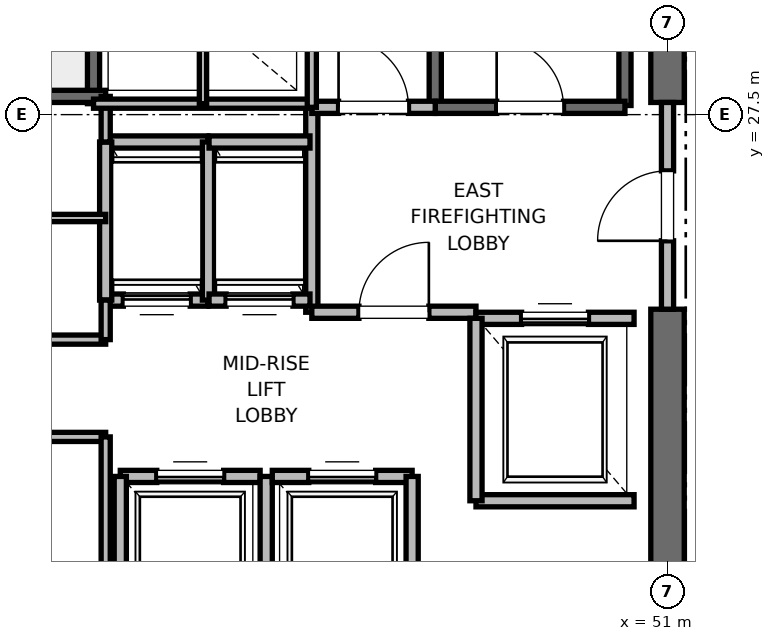
"""IFC4 building model, lengths in metres.
Left out: names, types, materials, properties, quantities, classifications, styles, units other than length and angle.
Written with IfcOpenShell. Run it as: python <this file> out.ifc"""

import sys

from ifc_helpers import new_model, si_unit, direction, frame, frame_2d, origin, place, context, subcontext, project, spatial, rectangle, extrude, element, fill, save


model = new_model("IFC4")
c1 = context("Model", 3, precision=1e-05, world=origin(), true_north=direction((0.0, 1.0)))
c2 = subcontext(c1, "Body", "Model", "MODEL_VIEW")
j1 = project(units=[si_unit("LENGTHUNIT", "METRE"), si_unit("PLANEANGLEUNIT", "RADIAN")], contexts=[c1])
p1 = place(None, origin())
s1 = spatial("IfcSite", under=j1, at=p1, CompositionType="ELEMENT")
p2 = place(p1, origin())
s2 = spatial("IfcBuilding", under=s1, at=p2, CompositionType="ELEMENT")
p3 = place(p2, frame((0.0, 0.0, 217.2)))
s3 = spatial("IfcBuildingStorey", under=s2, at=p3, CompositionType="ELEMENT", Elevation=217.2)
p4 = place(p3, frame((51.0, 18.5, 0.0), z_axis=(0.0, 0.0, 1.0), x_axis=(0.0, 1.0, 0.0)))
e1 = element("IfcWall", 1, at=p4, inside=s3, PredefinedType="SHEAR", context=c2, shape_type="SweptSolid", body=[
    extrude(rectangle(XDim=5.8, YDim=0.55, at=frame_2d((2.9, 0.0))), origin(), (0.0, 0.0, 1.0), 3.775),
])
p5 = place(p3, frame((51.0, 27.7, 0.0), z_axis=(0.0, 0.0, 1.0), x_axis=(0.0, 1.0, 0.0)))
e2 = element("IfcWall", 2, at=p5, inside=s3, PredefinedType="SHEAR", context=c2, shape_type="SweptSolid", body=[
    extrude(rectangle(XDim=8.8, YDim=0.55, at=frame_2d((4.4, 0.0))), origin(), (0.0, 0.0, 1.0), 3.775),
])
p6 = place(p3, frame((50.3, 27.65, 0.0), z_axis=(0.0, 0.0, 1.0), x_axis=(0.0, 1.0, 0.0)))
e3 = element("IfcWall", 3, at=p6, inside=s3, PredefinedType="SOLIDWALL", context=c2, shape_type="SweptSolid", body=[
    extrude(rectangle(XDim=8.15, YDim=0.2, at=frame_2d((4.075, 0.0))), origin(), (0.0, 0.0, 1.0), 3.775),
])
p7 = place(p3, frame((47.18, 27.62, 0.0), z_axis=(0.0, 0.0, 1.0), x_axis=(0.0, 1.0, 0.0)))
e4 = element("IfcWall", 4, at=p7, inside=s3, PredefinedType="SOLIDWALL", context=c2, shape_type="SweptSolid", body=[
    extrude(rectangle(XDim=8.18, YDim=0.2, at=frame_2d((4.09, 0.0))), origin(), (0.0, 0.0, 1.0), 3.775),
])
p8 = place(p3, frame((47.18, 27.62, 0.0), z_axis=(0.0, 0.0, 1.0), x_axis=(1.0, 0.0, 0.0)))
e5 = element("IfcWall", 5, at=p8, inside=s3, PredefinedType="SOLIDWALL", context=c2, shape_type="SweptSolid", body=[
    extrude(rectangle(XDim=3.12, YDim=0.2, at=frame_2d((1.56, 0.0))), origin(), (0.0, 0.0, 1.0), 3.775),
])
p9 = place(p8, frame((1.01, 0.0, 0.0)))
e6 = element("IfcOpeningElement", 6, at=p9, cuts=e5, PredefinedType="OPENING", context=c2, shape_type="SweptSolid", body=[
    extrude(rectangle(XDim=1.1, YDim=2.15, at=frame_2d((0.55, 1.075))), frame((0.0, 0.1, 0.0), z_axis=(0.0, -1.0, 0.0), x_axis=(1.0, 0.0, 0.0)), (0.0, 0.0, 1.0), 0.2),
])
p10 = place(p3, frame((41.56, 27.68, 0.0), z_axis=(0.0, 0.0, 1.0), x_axis=(0.0, 1.0, 0.0)))
e7 = element("IfcWall", 7, at=p10, inside=s3, PredefinedType="SOLIDWALL", context=c2, shape_type="SweptSolid", body=[
    extrude(rectangle(XDim=8.57, YDim=0.2, at=frame_2d((4.285, 0.0))), origin(), (0.0, 0.0, 1.0), 3.775),
])
p11 = place(p3, frame((38.44, 27.8, 0.0), z_axis=(0.0, 0.0, 1.0), x_axis=(1.0, 0.0, 0.0)))
e8 = element("IfcWall", 8, at=p11, inside=s3, PredefinedType="SOLIDWALL", context=c2, shape_type="SweptSolid", body=[
    extrude(rectangle(XDim=3.32, YDim=0.2, at=frame_2d((1.66, 0.0))), origin(), (0.0, 0.0, 1.0), 3.775),
])
p12 = place(p3, frame((45.15, 24.25, 0.0), z_axis=(0.0, 0.0, 1.0), x_axis=(0.0, 1.0, 0.0)))
e9 = element("IfcWall", 9, at=p12, inside=s3, PredefinedType="PARTITIONING", context=c2, shape_type="SweptSolid", body=[
    extrude(rectangle(XDim=3.37, YDim=0.2, at=frame_2d((1.685, 0.0))), origin(), (0.0, 0.0, 1.0), 3.775),
])
p13 = place(p3, frame((45.15, 24.25, 0.0), z_axis=(0.0, 0.0, 1.0), x_axis=(1.0, 0.0, 0.0)))
e10 = element("IfcWall", 10, at=p13, inside=s3, PredefinedType="PARTITIONING", context=c2, shape_type="SweptSolid", body=[
    extrude(rectangle(XDim=2.7, YDim=0.2, at=frame_2d((1.35, 0.0))), origin(), (0.0, 0.0, 1.0), 3.775),
])
p14 = place(p13, frame((0.775, 0.0, 0.0)))
e11 = element("IfcOpeningElement", 11, at=p14, cuts=e10, PredefinedType="OPENING", context=c2, shape_type="SweptSolid", body=[
    extrude(rectangle(XDim=1.15, YDim=2.2, at=frame_2d((0.575, 1.1))), frame((0.0, 0.1, 0.0), z_axis=(0.0, -1.0, 0.0), x_axis=(1.0, 0.0, 0.0)), (0.0, 0.0, 1.0), 0.2),
])
p15 = place(p3, frame((45.15, 27.62, 0.0), z_axis=(0.0, 0.0, 1.0), x_axis=(1.0, 0.0, 0.0)))
e12 = element("IfcWall", 12, at=p15, inside=s3, PredefinedType="PARTITIONING", context=c2, shape_type="SweptSolid", body=[
    extrude(rectangle(XDim=2.03, YDim=0.2, at=frame_2d((1.015, 0.0))), origin(), (0.0, 0.0, 1.0), 3.775),
])
p16 = place(p15, frame((0.44, 0.0, 0.0)))
e13 = element("IfcOpeningElement", 13, at=p16, cuts=e12, PredefinedType="OPENING", context=c2, shape_type="SweptSolid", body=[
    extrude(rectangle(XDim=1.15, YDim=2.2, at=frame_2d((0.575, 1.1))), frame((0.0, 0.1, 0.0), z_axis=(0.0, -1.0, 0.0), x_axis=(1.0, 0.0, 0.0)), (0.0, 0.0, 1.0), 0.2),
])
p17 = place(p3, frame((51.0, 24.3, 0.0), z_axis=(0.0, 0.0, 1.0), x_axis=(0.0, 1.0, 0.0)))
e14 = element("IfcWall", 14, at=p17, inside=s3, PredefinedType="PARTITIONING", context=c2, shape_type="SweptSolid", body=[
    extrude(rectangle(XDim=3.4, YDim=0.2, at=frame_2d((1.7, 0.0))), origin(), (0.0, 0.0, 1.0), 2.755),
])
p18 = place(p17, frame((1.125, 0.0, 0.0)))
e15 = element("IfcOpeningElement", 15, at=p18, cuts=e14, PredefinedType="OPENING", context=c2, shape_type="SweptSolid", body=[
    extrude(rectangle(XDim=1.15, YDim=2.2, at=frame_2d((0.575, 1.1))), frame((0.0, 0.1, 0.0), z_axis=(0.0, -1.0, 0.0), x_axis=(1.0, 0.0, 0.0)), (0.0, 0.0, 1.0), 0.2),
])
p19 = place(p3, frame((47.85, 21.15, 0.0), z_axis=(0.0, 0.0, 1.0), x_axis=(1.0, 0.0, 0.0)))
e16 = element("IfcWall", 16, at=p19, inside=s3, PredefinedType="SOLIDWALL", context=c2, shape_type="SweptSolid", body=[
    extrude(rectangle(XDim=2.6, YDim=0.2, at=frame_2d((1.3, 0.0))), origin(), (0.0, 0.0, 1.0), 3.775),
])
p20 = place(p3, frame((50.45, 24.15, 0.0), z_axis=(0.0, 0.0, 1.0), x_axis=(-1.0, 0.0, 0.0)))
e17 = element("IfcWall", 17, at=p20, inside=s3, PredefinedType="SOLIDWALL", context=c2, shape_type="SweptSolid", body=[
    extrude(rectangle(XDim=2.6, YDim=0.2, at=frame_2d((1.3, 0.0))), origin(), (0.0, 0.0, 1.0), 2.755),
])
p21 = place(p20, frame((0.75, 0.0, 0.0)))
e18 = element("IfcOpeningElement", 18, at=p21, cuts=e17, PredefinedType="OPENING", context=c2, shape_type="SweptSolid", body=[
    extrude(rectangle(XDim=1.1, YDim=2.2, at=frame_2d((0.55, 1.1))), frame((0.0, 0.1, 0.0), z_axis=(0.0, -1.0, 0.0), x_axis=(1.0, 0.0, 0.0)), (0.0, 0.0, 1.0), 0.2),
])
p22 = place(p3, frame((47.85, 24.15, 0.0), z_axis=(0.0, 0.0, 1.0), x_axis=(0.0, -1.0, 0.0)))
e19 = element("IfcWall", 19, at=p22, inside=s3, PredefinedType="SOLIDWALL", context=c2, shape_type="SweptSolid", body=[
    extrude(rectangle(XDim=3.0, YDim=0.2, at=frame_2d((1.5, 0.0))), origin(), (0.0, 0.0, 1.0), 3.775),
])
p23 = place(p3, frame((44.3, 21.55, 0.0), z_axis=(0.0, 0.0, 1.0), x_axis=(-1.0, 0.0, 0.0)))
e20 = element("IfcWall", 20, at=p23, inside=s3, PredefinedType="SOLIDWALL", context=c2, shape_type="SweptSolid", body=[
    extrude(rectangle(XDim=2.3, YDim=0.2, at=frame_2d((1.15, 0.0))), origin(), (0.0, 0.0, 1.0), 3.775),
])
p24 = place(p23, frame((0.6, 0.0, 0.0)))
e21 = element("IfcOpeningElement", 21, at=p24, cuts=e20, PredefinedType="OPENING", context=c2, shape_type="SweptSolid", body=[
    extrude(rectangle(XDim=1.1, YDim=2.2, at=frame_2d((0.55, 1.1))), frame((0.0, 0.1, 0.0), z_axis=(0.0, -1.0, 0.0), x_axis=(1.0, 0.0, 0.0)), (0.0, 0.0, 1.0), 0.2),
])
p25 = place(p3, frame((42.0, 21.55, 0.0), z_axis=(0.0, 0.0, 1.0), x_axis=(0.0, -1.0, 0.0)))
e22 = element("IfcWall", 22, at=p25, inside=s3, PredefinedType="SOLIDWALL", context=c2, shape_type="SweptSolid", body=[
    extrude(rectangle(XDim=2.6, YDim=0.2, at=frame_2d((1.3, 0.0))), origin(), (0.0, 0.0, 1.0), 2.755),
])
p26 = place(p3, frame((44.4, 18.95, 0.0), z_axis=(0.0, 0.0, 1.0), x_axis=(0.0, 1.0, 0.0)))
e23 = element("IfcWall", 23, at=p26, inside=s3, PredefinedType="SOLIDWALL", context=c2, shape_type="SweptSolid", body=[
    extrude(rectangle(XDim=2.6, YDim=0.2, at=frame_2d((1.3, 0.0))), origin(), (0.0, 0.0, 1.0), 3.775),
])
p27 = place(p3, frame((46.8, 21.55, 0.0), z_axis=(0.0, 0.0, 1.0), x_axis=(-1.0, 0.0, 0.0)))
e24 = element("IfcWall", 24, at=p27, inside=s3, PredefinedType="SOLIDWALL", context=c2, shape_type="SweptSolid", body=[
    extrude(rectangle(XDim=2.3, YDim=0.2, at=frame_2d((1.15, 0.0))), origin(), (0.0, 0.0, 1.0), 3.775),
])
p28 = place(p27, frame((0.6, 0.0, 0.0)))
e25 = element("IfcOpeningElement", 25, at=p28, cuts=e24, PredefinedType="OPENING", context=c2, shape_type="SweptSolid", body=[
    extrude(rectangle(XDim=1.1, YDim=2.2, at=frame_2d((0.55, 1.1))), frame((0.0, 0.1, 0.0), z_axis=(0.0, -1.0, 0.0), x_axis=(1.0, 0.0, 0.0)), (0.0, 0.0, 1.0), 0.2),
])
p29 = place(p3, frame((46.8, 18.95, 0.0), z_axis=(0.0, 0.0, 1.0), x_axis=(0.0, 1.0, 0.0)))
e26 = element("IfcWall", 26, at=p29, inside=s3, PredefinedType="SOLIDWALL", context=c2, shape_type="SweptSolid", body=[
    extrude(rectangle(XDim=2.6, YDim=0.2, at=frame_2d((1.3, 0.0))), origin(), (0.0, 0.0, 1.0), 3.775),
])
p30 = place(p3, frame((41.76, 24.45, 0.0), z_axis=(0.0, 0.0, 1.0), x_axis=(1.0, 0.0, 0.0)))
e27 = element("IfcWall", 27, at=p30, inside=s3, PredefinedType="SOLIDWALL", context=c2, shape_type="SweptSolid", body=[
    extrude(rectangle(XDim=1.68, YDim=0.2, at=frame_2d((0.84, 0.0))), origin(), (0.0, 0.0, 1.0), 3.775),
])
p31 = place(p30, frame((0.29, 0.0, 0.0)))
e28 = element("IfcOpeningElement", 28, at=p31, cuts=e27, PredefinedType="OPENING", context=c2, shape_type="SweptSolid", body=[
    extrude(rectangle(XDim=1.1, YDim=2.2, at=frame_2d((0.55, 1.1))), frame((0.0, 0.1, 0.0), z_axis=(0.0, -1.0, 0.0), x_axis=(1.0, 0.0, 0.0)), (0.0, 0.0, 1.0), 0.2),
])
p32 = place(p3, frame((43.44, 27.05, 0.0), z_axis=(0.0, 0.0, 1.0), x_axis=(-1.0, 0.0, 0.0)))
e29 = element("IfcWall", 29, at=p32, inside=s3, PredefinedType="SOLIDWALL", context=c2, shape_type="SweptSolid", body=[
    extrude(rectangle(XDim=1.68, YDim=0.2, at=frame_2d((0.84, 0.0))), origin(), (0.0, 0.0, 1.0), 3.775),
])
for number, where, z_axis, x_axis in (
    (30, (41.76, 27.05, 0.0), (0.0, 0.0, 1.0), (0.0, -1.0, 0.0)),
    (31, (43.45, 24.45, 0.0), (0.0, 0.0, 1.0), (0.0, 1.0, 0.0)),
):
    element("IfcWall", number, at=place(p3, frame(where, z_axis=z_axis, x_axis=x_axis)), inside=s3, PredefinedType="SOLIDWALL", context=c2, shape_type="SweptSolid", body=[
        extrude(rectangle(XDim=2.6, YDim=0.2, at=frame_2d((1.3, 0.0))), origin(), (0.0, 0.0, 1.0), 3.775),
    ])
p33 = place(p3, frame((43.46, 24.45, 0.0), z_axis=(0.0, 0.0, 1.0), x_axis=(1.0, 0.0, 0.0)))
e32 = element("IfcWall", 32, at=p33, inside=s3, PredefinedType="SOLIDWALL", context=c2, shape_type="SweptSolid", body=[
    extrude(rectangle(XDim=1.66, YDim=0.2, at=frame_2d((0.83, 0.0))), origin(), (0.0, 0.0, 1.0), 3.775),
])
p34 = place(p33, frame((0.28, 0.0, 0.0)))
e33 = element("IfcOpeningElement", 33, at=p34, cuts=e32, PredefinedType="OPENING", context=c2, shape_type="SweptSolid", body=[
    extrude(rectangle(XDim=1.1, YDim=2.2, at=frame_2d((0.55, 1.1))), frame((0.0, 0.1, 0.0), z_axis=(0.0, -1.0, 0.0), x_axis=(1.0, 0.0, 0.0)), (0.0, 0.0, 1.0), 0.2),
])
p35 = place(p3, frame((45.12, 27.05, 0.0), z_axis=(0.0, 0.0, 1.0), x_axis=(-1.0, 0.0, 0.0)))
e34 = element("IfcWall", 34, at=p35, inside=s3, PredefinedType="SOLIDWALL", context=c2, shape_type="SweptSolid", body=[
    extrude(rectangle(XDim=1.66, YDim=0.2, at=frame_2d((0.83, 0.0))), origin(), (0.0, 0.0, 1.0), 3.775),
])
for number, where, z_axis, x_axis in (
    (35, (39.95, 22.2, 0.0), (0.0, 0.0, 1.0), (1.0, 0.0, 0.0)),
    (36, (39.95, 23.8, 0.0), (0.0, 0.0, 1.0), (1.0, 0.0, 0.0)),
):
    element("IfcWall", number, at=place(p3, frame(where, z_axis=z_axis, x_axis=x_axis)), inside=s3, PredefinedType="PARTITIONING", context=c2, shape_type="SweptSolid", body=[
        extrude(rectangle(XDim=1.81, YDim=0.15, at=frame_2d((0.905, 0.0))), origin(), (0.0, 0.0, 1.0), 2.85),
    ])
p36 = place(p3, frame((39.95, 25.8, 0.0), z_axis=(0.0, 0.0, 1.0), x_axis=(1.0, 0.0, 0.0)))
e37 = element("IfcWall", 37, at=p36, inside=s3, PredefinedType="PARTITIONING", context=c2, shape_type="SweptSolid", body=[
    extrude(rectangle(XDim=1.81, YDim=0.12, at=frame_2d((0.905, 0.0))), origin(), (0.0, 0.0, 1.0), 2.85),
])
p37 = place(p3, frame((41.76, 18.6, 0.0), z_axis=(0.0, 0.0, 1.0), x_axis=(0.0, 1.0, 0.0)))
e38 = element("IfcWall", 38, at=p37, inside=s3, PredefinedType="PARTITIONING", context=c2, shape_type="SweptSolid", body=[
    extrude(rectangle(XDim=3.6, YDim=0.15, at=frame_2d((1.8, 0.0))), origin(), (0.0, 0.0, 1.0), 2.755),
])
p38 = place(p3, frame((41.76, 23.8, 0.0), z_axis=(0.0, 0.0, 1.0), x_axis=(0.0, 1.0, 0.0)))
e39 = element("IfcWall", 39, at=p38, inside=s3, PredefinedType="PARTITIONING", context=c2, shape_type="SweptSolid", body=[
    extrude(rectangle(XDim=0.65, YDim=0.15, at=frame_2d((0.325, 0.0))), origin(), (0.0, 0.0, 1.0), 2.85),
])
p39 = place(p3, frame((41.76, 27.05, 0.0), z_axis=(0.0, 0.0, 1.0), x_axis=(0.0, 1.0, 0.0)))
e40 = element("IfcWall", 40, at=p39, inside=s3, PredefinedType="PARTITIONING", context=c2, shape_type="SweptSolid", body=[
    extrude(rectangle(XDim=0.75, YDim=0.15, at=frame_2d((0.375, 0.0))), origin(), (0.0, 0.0, 1.0), 2.85),
])
p40 = place(p3, frame((41.56, 27.68, 0.0), z_axis=(0.0, 0.0, 1.0), x_axis=(1.0, 0.0, 0.0)))
e41 = element("IfcWall", 41, at=p40, inside=s3, PredefinedType="PARTITIONING", context=c2, shape_type="SweptSolid", body=[
    extrude(rectangle(XDim=3.59, YDim=0.15, at=frame_2d((1.795, 0.0))), origin(), (0.0, 0.0, 1.0), 2.85),
])
p41 = place(p3, frame((45.15, 27.62, 0.0), z_axis=(0.0, 0.0, 1.0), x_axis=(0.0, 1.0, 0.0)))
e42 = element("IfcWall", 42, at=p41, inside=s3, PredefinedType="PARTITIONING", context=c2, shape_type="SweptSolid", body=[
    extrude(rectangle(XDim=3.1, YDim=0.15, at=frame_2d((1.55, 0.0))), origin(), (0.0, 0.0, 1.0), 2.85),
])
p42 = place(p3, frame((43.36, 27.68, 0.0), z_axis=(0.0, 0.0, 1.0), x_axis=(0.0, 1.0, 0.0)))
e43 = element("IfcWall", 43, at=p42, inside=s3, PredefinedType="PARTITIONING", context=c2, shape_type="SweptSolid", body=[
    extrude(rectangle(XDim=3.04, YDim=0.12, at=frame_2d((1.52, 0.0))), origin(), (0.0, 0.0, 1.0), 2.85),
])
p43 = place(p9, origin())
e44 = element("IfcDoor", 44, at=p43, inside=s3, OperationType="SINGLE_SWING_LEFT", PredefinedType="DOOR", context=c2, shape_type="SweptSolid", body=[
    extrude(rectangle(XDim=1.1, YDim=2.15, at=frame_2d((0.55, 1.075))), frame((0.0, 0.025, 0.0), z_axis=(0.0, -1.0, 0.0), x_axis=(1.0, 0.0, 0.0)), (0.0, 0.0, 1.0), 0.05),
])
fill(e6, e44)
p44 = place(p14, origin())
e45 = element("IfcDoor", 45, at=p44, inside=s3, OperationType="SINGLE_SWING_RIGHT", PredefinedType="DOOR", context=c2, shape_type="SweptSolid", body=[
    extrude(rectangle(XDim=1.15, YDim=2.2, at=frame_2d((0.575, 1.1))), frame((0.0, 0.025, 0.0), z_axis=(0.0, -1.0, 0.0), x_axis=(1.0, 0.0, 0.0)), (0.0, 0.0, 1.0), 0.05),
])
fill(e11, e45)
p45 = place(p16, origin())
e46 = element("IfcDoor", 46, at=p45, inside=s3, OperationType="SINGLE_SWING_LEFT", PredefinedType="DOOR", context=c2, shape_type="SweptSolid", body=[
    extrude(rectangle(XDim=1.15, YDim=2.2, at=frame_2d((0.575, 1.1))), frame((0.0, 0.025, 0.0), z_axis=(0.0, -1.0, 0.0), x_axis=(1.0, 0.0, 0.0)), (0.0, 0.0, 1.0), 0.05),
])
fill(e13, e46)
p46 = place(p18, origin())
e47 = element("IfcDoor", 47, at=p46, inside=s3, OperationType="SINGLE_SWING_LEFT", PredefinedType="DOOR", context=c2, shape_type="SweptSolid", body=[
    extrude(rectangle(XDim=1.15, YDim=2.2, at=frame_2d((0.575, 1.1))), frame((0.0, 0.025, 0.0), z_axis=(0.0, -1.0, 0.0), x_axis=(1.0, 0.0, 0.0)), (0.0, 0.0, 1.0), 0.05),
])
fill(e15, e47)
p47 = place(p21, origin())
e48 = element("IfcDoor", 48, at=p47, inside=s3, OperationType="SLIDING_TO_RIGHT", PredefinedType="DOOR", context=c2, shape_type="SweptSolid", body=[
    extrude(rectangle(XDim=1.1, YDim=2.2, at=frame_2d((0.55, 1.1))), frame((0.0, 0.025, 0.0), z_axis=(0.0, -1.0, 0.0), x_axis=(1.0, 0.0, 0.0)), (0.0, 0.0, 1.0), 0.05),
])
fill(e18, e48)
p48 = place(p24, origin())
e49 = element("IfcDoor", 49, at=p48, inside=s3, OperationType="SLIDING_TO_RIGHT", PredefinedType="DOOR", context=c2, shape_type="SweptSolid", body=[
    extrude(rectangle(XDim=1.1, YDim=2.2, at=frame_2d((0.55, 1.1))), frame((0.0, 0.025, 0.0), z_axis=(0.0, -1.0, 0.0), x_axis=(1.0, 0.0, 0.0)), (0.0, 0.0, 1.0), 0.05),
])
fill(e21, e49)
p49 = place(p28, origin())
e50 = element("IfcDoor", 50, at=p49, inside=s3, OperationType="SLIDING_TO_RIGHT", PredefinedType="DOOR", context=c2, shape_type="SweptSolid", body=[
    extrude(rectangle(XDim=1.1, YDim=2.2, at=frame_2d((0.55, 1.1))), frame((0.0, 0.025, 0.0), z_axis=(0.0, -1.0, 0.0), x_axis=(1.0, 0.0, 0.0)), (0.0, 0.0, 1.0), 0.05),
])
fill(e25, e50)
p50 = place(p31, origin())
e51 = element("IfcDoor", 51, at=p50, inside=s3, OperationType="SLIDING_TO_RIGHT", PredefinedType="DOOR", context=c2, shape_type="SweptSolid", body=[
    extrude(rectangle(XDim=1.1, YDim=2.2, at=frame_2d((0.55, 1.1))), frame((0.0, 0.025, 0.0), z_axis=(0.0, -1.0, 0.0), x_axis=(1.0, 0.0, 0.0)), (0.0, 0.0, 1.0), 0.05),
])
fill(e28, e51)
p51 = place(p34, origin())
e52 = element("IfcDoor", 52, at=p51, inside=s3, OperationType="SLIDING_TO_RIGHT", PredefinedType="DOOR", context=c2, shape_type="SweptSolid", body=[
    extrude(rectangle(XDim=1.1, YDim=2.2, at=frame_2d((0.55, 1.1))), frame((0.0, 0.025, 0.0), z_axis=(0.0, -1.0, 0.0), x_axis=(1.0, 0.0, 0.0)), (0.0, 0.0, 1.0), 0.05),
])
fill(e33, e52)
save(model, sys.argv[1])
